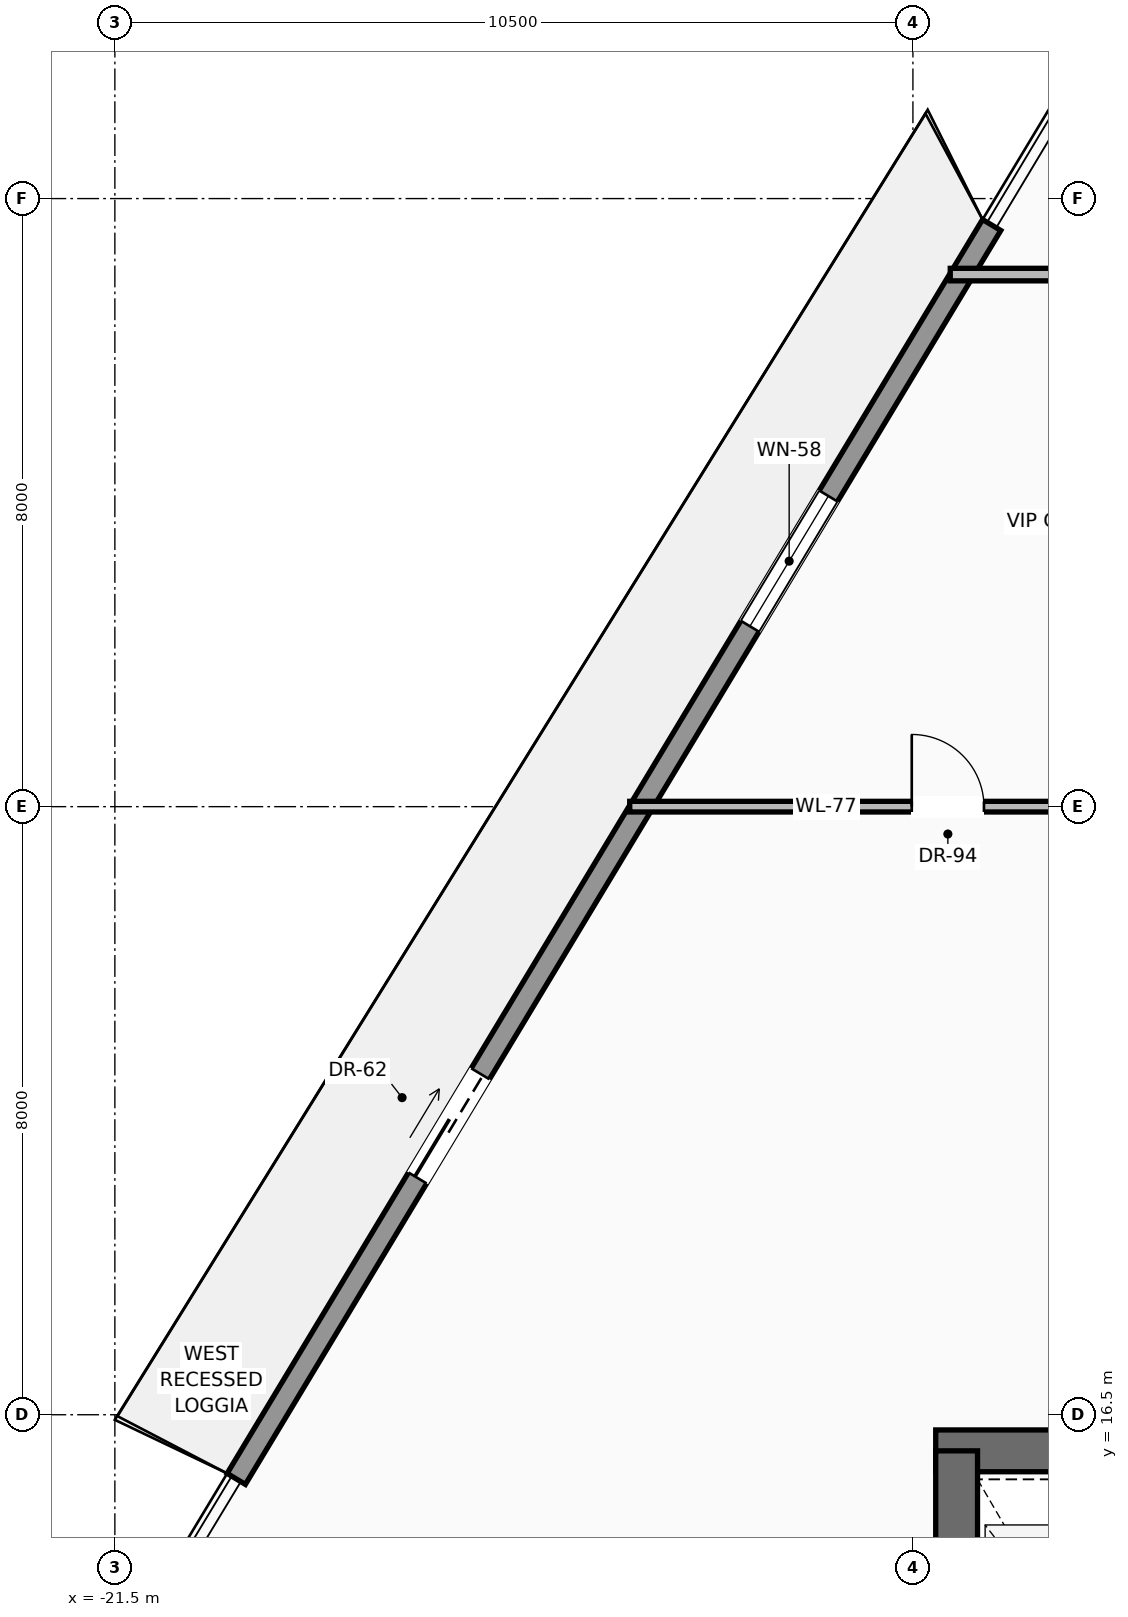
"""IFC4 building model, lengths in metres.
Left out: names, types, materials, properties, quantities, classifications, styles, units other than length and angle.
Written with IfcOpenShell. Run it as: python <this file> out.ifc"""

import sys

from ifc_helpers import new_model, si_unit, direction, frame, frame_2d, origin, place, context, subcontext, project, spatial, rectangle, extrude, source, transform, mapped, element, fill, save


model = new_model("IFC4")
c1 = context("Model", 3, precision=1e-05, world=origin(), true_north=direction((0.0, 1.0)))
c2 = subcontext(c1, "Body", "Model", "MODEL_VIEW")
j1 = project(units=[si_unit("LENGTHUNIT", "METRE"), si_unit("PLANEANGLEUNIT", "RADIAN")], contexts=[c1])
p1 = place(None, origin())
s1 = spatial("IfcSite", under=j1, at=p1, CompositionType="ELEMENT")
p2 = place(p1, origin())
s2 = spatial("IfcBuilding", under=s1, at=p2, CompositionType="ELEMENT")
p3 = place(p2, frame((0.0, 0.0, 215.4)))
s3 = spatial("IfcBuildingStorey", under=s2, at=p3, CompositionType="ELEMENT", Elevation=215.4)
p4 = place(p3, frame((-10.7, 16.025, 0.0), z_axis=(0.0, 0.0, 1.0), x_axis=(1.0, 0.0, 0.0)))
e1 = element("IfcWall", 1, at=p4, inside=s3, PredefinedType="SHEAR", context=c2, shape_type="SweptSolid", body=[
    extrude(rectangle(XDim=21.4, YDim=0.55, at=frame_2d((10.7, 0.0))), origin(), (0.0, 0.0, 1.0), 4.39),
])
p5 = place(p4, frame((3.27, 0.0, 0.0)))
e2 = element("IfcOpeningElement", 2, at=p5, cuts=e1, PredefinedType="OPENING", context=c2, shape_type="SweptSolid", body=[
    extrude(rectangle(XDim=1.3, YDim=2.3, at=frame_2d((0.65, 1.15))), frame((0.0, 0.285, 0.0), z_axis=(0.0, -1.0, 0.0), x_axis=(1.0, 0.0, 0.0)), (0.0, 0.0, 1.0), 0.57),
])
p6 = place(p4, frame((9.7, 0.0, 0.0)))
e3 = element("IfcOpeningElement", 3, at=p6, cuts=e1, PredefinedType="OPENING", context=c2, shape_type="SweptSolid", body=[
    extrude(rectangle(XDim=2.0, YDim=2.4, at=frame_2d((1.0, 1.2))), frame((0.0, 0.285, 0.0), z_axis=(0.0, -1.0, 0.0), x_axis=(1.0, 0.0, 0.0)), (0.0, 0.0, 1.0), 0.57),
])
p7 = place(p3, frame((-10.425, 0.575, 0.0), z_axis=(0.0, 0.0, 1.0), x_axis=(0.0, 1.0, 0.0)))
e4 = element("IfcWall", 4, at=p7, inside=s3, PredefinedType="SHEAR", context=c2, shape_type="SweptSolid", body=[
    extrude(rectangle(XDim=15.45, YDim=0.55, at=frame_2d((7.725, 0.0))), origin(), (0.0, 0.0, 1.0), 4.39),
])
p8 = place(p3, frame((-19.903, 15.656, 0.0), z_axis=(0.0, 0.0, 1.0), x_axis=(0.516051519047, 0.856557546047, 0.0)))
e5 = element("IfcWall", 5, at=p8, inside=s3, PredefinedType="SOLIDWALL", context=c2, shape_type="SweptSolid", body=[
    extrude(rectangle(XDim=19.259, YDim=0.28, at=frame_2d((9.63, 0.0))), origin(), (0.0, 0.0, 1.0), 3.97),
])
p9 = place(p8, frame((4.622, 0.0, 0.0)))
e6 = element("IfcOpeningElement", 6, at=p9, cuts=e5, PredefinedType="OPENING", context=c2, shape_type="SweptSolid", body=[
    extrude(rectangle(XDim=1.6, YDim=2.35, at=frame_2d((0.8, 1.175))), frame((0.0, 0.15, 0.0), z_axis=(0.0, -1.0, 0.0), x_axis=(1.0, 0.0, 0.0)), (0.0, 0.0, 1.0), 0.3),
])
p10 = place(p8, frame((13.096, 0.0, 0.9)))
e7 = element("IfcOpeningElement", 7, at=p10, cuts=e5, PredefinedType="OPENING", context=c2, shape_type="SweptSolid", body=[
    extrude(rectangle(XDim=2.0, YDim=1.55, at=frame_2d((1.0, 0.775))), frame((0.0, 0.15, 0.0), z_axis=(0.0, -1.0, 0.0), x_axis=(1.0, 0.0, 0.0)), (0.0, 0.0, 1.0), 0.3),
])
p11 = place(p3, frame((-10.509, 31.5, 0.0), z_axis=(0.0, 0.0, 1.0), x_axis=(1.0, 0.0, 0.0)))
e8 = element("IfcWall", 8, at=p11, inside=s3, PredefinedType="PARTITIONING", context=c2, shape_type="SweptSolid", body=[
    extrude(rectangle(XDim=20.228, YDim=0.165, at=frame_2d((10.114, 0.0))), origin(), (0.0, 0.0, 1.0), 3.833),
])
p12 = place(p11, frame((9.114, 0.0, 0.0)))
e9 = element("IfcOpeningElement", 9, at=p12, cuts=e8, PredefinedType="OPENING", context=c2, shape_type="SweptSolid", body=[
    extrude(rectangle(XDim=2.0, YDim=2.4, at=frame_2d((1.0, 1.2))), frame((0.0, 0.093, 0.0), z_axis=(0.0, -1.0, 0.0), x_axis=(1.0, 0.0, 0.0)), (0.0, 0.0, 1.0), 0.185),
])
p13 = place(p11, frame((17.464, 0.0, 0.0)))
e10 = element("IfcOpeningElement", 10, at=p13, cuts=e8, PredefinedType="OPENING", context=c2, shape_type="SweptSolid", body=[
    extrude(rectangle(XDim=0.95, YDim=2.2, at=frame_2d((0.475, 1.1))), frame((0.0, 0.093, 0.0), z_axis=(0.0, -1.0, 0.0), x_axis=(1.0, 0.0, 0.0)), (0.0, 0.0, 1.0), 0.185),
])
p14 = place(p11, frame((2.195, 0.0, 0.0)))
e11 = element("IfcOpeningElement", 11, at=p14, cuts=e8, PredefinedType="OPENING", context=c2, shape_type="SweptSolid", body=[
    extrude(rectangle(XDim=0.95, YDim=2.2, at=frame_2d((0.475, 1.1))), frame((0.0, 0.093, 0.0), z_axis=(0.0, -1.0, 0.0), x_axis=(1.0, 0.0, 0.0)), (0.0, 0.0, 1.0), 0.185),
])
p15 = place(p3, frame((-14.726, 24.5, 0.0), z_axis=(0.0, 0.0, 1.0), x_axis=(1.0, 0.0, 0.0)))
e12 = element("IfcWall", 12, at=p15, inside=s3, PredefinedType="PARTITIONING", context=c2, shape_type="SweptSolid", body=[
    extrude(rectangle(XDim=9.226, YDim=0.14, at=frame_2d((4.613, 0.0))), origin(), (0.0, 0.0, 1.0), 3.833),
])
p16 = place(p15, frame((3.711, 0.0, 0.0)))
e13 = element("IfcOpeningElement", 13, at=p16, cuts=e12, PredefinedType="OPENING", context=c2, shape_type="SweptSolid", body=[
    extrude(rectangle(XDim=0.95, YDim=2.2, at=frame_2d((0.475, 1.1))), frame((0.0, 0.08, 0.0), z_axis=(0.0, -1.0, 0.0), x_axis=(1.0, 0.0, 0.0)), (0.0, 0.0, 1.0), 0.16),
])
m1 = source(origin(), c2, "Body", "SweptSolid", [
    extrude(rectangle(XDim=1.6, YDim=2.35, at=frame_2d((0.8, 1.175))), frame((0.0, 0.025, 0.0), z_axis=(0.0, -1.0, 0.0), x_axis=(1.0, 0.0, 0.0)), (0.0, 0.0, 1.0), 0.05),
])
p17 = place(p9, origin())
e14 = element("IfcDoor", 14, at=p17, inside=s3, OperationType="SLIDING_TO_LEFT", PredefinedType="DOOR", context=c2, shape_type="MappedRepresentation", body=[
    mapped(m1, transform((0.0, 0.0, 0.0), scale=1.0)),
])
fill(e6, e14)
m2 = source(origin(), c2, "Body", "SweptSolid", [
    extrude(rectangle(XDim=2.0, YDim=1.55, at=frame_2d((1.0, 0.775))), frame((0.0, 0.03, 0.0), z_axis=(0.0, -1.0, 0.0), x_axis=(1.0, 0.0, 0.0)), (0.0, 0.0, 1.0), 0.06),
])
p18 = place(p10, origin())
e15 = element("IfcWindow", 15, at=p18, inside=s3, PartitioningType="SINGLE_PANEL", PredefinedType="WINDOW", context=c2, shape_type="MappedRepresentation", body=[
    mapped(m2, transform((0.0, 0.0, 0.0), scale=1.0)),
])
fill(e7, e15)
m3 = source(origin(), c2, "Body", "SweptSolid", [
    extrude(rectangle(XDim=0.95, YDim=2.2, at=frame_2d((0.475, 1.1))), frame((0.0, 0.025, 0.0), z_axis=(0.0, -1.0, 0.0), x_axis=(1.0, 0.0, 0.0)), (0.0, 0.0, 1.0), 0.05),
])
p19 = place(p16, origin())
e16 = element("IfcDoor", 16, at=p19, inside=s3, OperationType="SINGLE_SWING_LEFT", PredefinedType="DOOR", context=c2, shape_type="MappedRepresentation", body=[
    mapped(m3, transform((0.0, 0.0, 0.0), scale=1.0)),
])
fill(e13, e16)
save(model, sys.argv[1])
